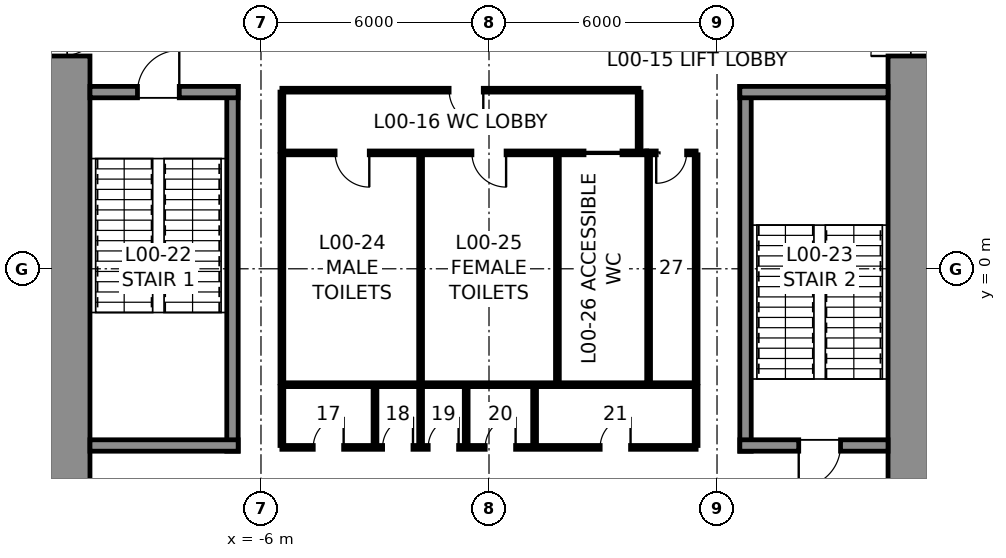
"""IFC4 building model, lengths in metres.
Left out: names, types, materials, properties, quantities, classifications, styles, units other than length and angle.
Written with IfcOpenShell. Run it as: python <this file> out.ifc"""

import sys

from ifc_helpers import new_model, si_unit, direction, frame, frame_2d, origin, place, context, subcontext, project, spatial, rectangle, extrude, element, fill, save


model = new_model("IFC4")
c1 = context("Model", 3, precision=1e-05, world=origin(), true_north=direction((0.0, 1.0)))
c2 = subcontext(c1, "Body", "Model", "MODEL_VIEW")
j1 = project(units=[si_unit("LENGTHUNIT", "METRE"), si_unit("PLANEANGLEUNIT", "RADIAN")], contexts=[c1])
p1 = place(None, origin())
s1 = spatial("IfcSite", under=j1, at=p1, CompositionType="ELEMENT")
p2 = place(p1, origin())
s2 = spatial("IfcBuilding", under=s1, at=p2, CompositionType="ELEMENT")
p3 = place(p2, origin())
s3 = spatial("IfcBuildingStorey", under=s2, at=p3, CompositionType="ELEMENT", Elevation=0.0)
p4 = place(p3, frame((11.25, 10.5, 0.0), z_axis=(0.0, 0.0, 1.0), x_axis=(0.0, -1.0, 0.0)))
e1 = element("IfcWall", 1, at=p4, inside=s3, PredefinedType="SHEAR", context=c2, shape_type="SweptSolid", body=[
    extrude(rectangle(XDim=21.0, YDim=1.5, at=frame_2d((10.5, 0.0))), origin(), (0.0, 0.0, 1.0), 6.0),
])
p5 = place(p4, frame((3.7, 0.0, 0.0)))
e2 = element("IfcOpeningElement", 2, at=p5, cuts=e1, PredefinedType="OPENING", context=c2, shape_type="SweptSolid", body=[
    extrude(rectangle(XDim=1.2, YDim=2.3, at=frame_2d((0.6, 1.15))), frame((0.0, 0.76, 0.0), z_axis=(0.0, -1.0, 0.0), x_axis=(1.0, 0.0, 0.0)), (0.0, 0.0, 1.0), 1.52),
])
p6 = place(p4, frame((16.1, 0.0, 0.0)))
e3 = element("IfcOpeningElement", 3, at=p6, cuts=e1, PredefinedType="OPENING", context=c2, shape_type="SweptSolid", body=[
    extrude(rectangle(XDim=1.2, YDim=2.3, at=frame_2d((0.6, 1.15))), frame((0.0, 0.76, 0.0), z_axis=(0.0, -1.0, 0.0), x_axis=(1.0, 0.0, 0.0)), (0.0, 0.0, 1.0), 1.52),
])
p7 = place(p3, frame((-11.25, -10.5, 0.0), z_axis=(0.0, 0.0, 1.0), x_axis=(0.0, 1.0, 0.0)))
e4 = element("IfcWall", 4, at=p7, inside=s3, PredefinedType="SHEAR", context=c2, shape_type="SweptSolid", body=[
    extrude(rectangle(XDim=21.0, YDim=1.5, at=frame_2d((10.5, 0.0))), origin(), (0.0, 0.0, 1.0), 6.0),
])
p8 = place(p7, frame((16.1, 0.0, 0.0)))
e5 = element("IfcOpeningElement", 5, at=p8, cuts=e4, PredefinedType="OPENING", context=c2, shape_type="SweptSolid", body=[
    extrude(rectangle(XDim=1.2, YDim=2.3, at=frame_2d((0.6, 1.15))), frame((0.0, 0.76, 0.0), z_axis=(0.0, -1.0, 0.0), x_axis=(1.0, 0.0, 0.0)), (0.0, 0.0, 1.0), 1.52),
])
p9 = place(p7, frame((3.7, 0.0, 0.0)))
e6 = element("IfcOpeningElement", 6, at=p9, cuts=e4, PredefinedType="OPENING", context=c2, shape_type="SweptSolid", body=[
    extrude(rectangle(XDim=1.2, YDim=2.3, at=frame_2d((0.6, 1.15))), frame((0.0, 0.76, 0.0), z_axis=(0.0, -1.0, 0.0), x_axis=(1.0, 0.0, 0.0)), (0.0, 0.0, 1.0), 1.52),
])
p10 = place(p3, frame((-6.75, -4.8, 0.0), z_axis=(0.0, 0.0, 1.0), x_axis=(0.0, 1.0, 0.0)))
e7 = element("IfcWall", 7, at=p10, inside=s3, PredefinedType="SOLIDWALL", context=c2, shape_type="SweptSolid", body=[
    extrude(rectangle(XDim=9.6, YDim=0.3, at=frame_2d((4.8, 0.0))), origin(), (0.0, 0.0, 1.0), 5.75),
])
p11 = place(p3, frame((-10.5, 4.65, 0.0), z_axis=(0.0, 0.0, 1.0), x_axis=(1.0, 0.0, 0.0)))
e8 = element("IfcWall", 8, at=p11, inside=s3, PredefinedType="SOLIDWALL", context=c2, shape_type="SweptSolid", body=[
    extrude(rectangle(XDim=3.9, YDim=0.3, at=frame_2d((1.95, 0.0))), origin(), (0.0, 0.0, 1.0), 5.75),
])
p12 = place(p11, frame((1.25, 0.0, 0.0)))
e9 = element("IfcOpeningElement", 9, at=p12, cuts=e8, PredefinedType="OPENING", context=c2, shape_type="SweptSolid", body=[
    extrude(rectangle(XDim=1.1, YDim=2.3, at=frame_2d((0.55, 1.15))), frame((0.0, 0.16, 0.0), z_axis=(0.0, -1.0, 0.0), x_axis=(1.0, 0.0, 0.0)), (0.0, 0.0, 1.0), 0.32),
])
p13 = place(p3, frame((-6.6, -4.65, 0.0), z_axis=(0.0, 0.0, 1.0), x_axis=(-1.0, 0.0, 0.0)))
e10 = element("IfcWall", 10, at=p13, inside=s3, PredefinedType="SOLIDWALL", context=c2, shape_type="SweptSolid", body=[
    extrude(rectangle(XDim=3.9, YDim=0.3, at=frame_2d((1.95, 0.0))), origin(), (0.0, 0.0, 1.0), 5.75),
])
p14 = place(p3, frame((6.75, -4.8, 0.0), z_axis=(0.0, 0.0, 1.0), x_axis=(0.0, 1.0, 0.0)))
e11 = element("IfcWall", 11, at=p14, inside=s3, PredefinedType="SOLIDWALL", context=c2, shape_type="SweptSolid", body=[
    extrude(rectangle(XDim=9.6, YDim=0.3, at=frame_2d((4.8, 0.0))), origin(), (0.0, 0.0, 1.0), 5.75),
])
p15 = place(p3, frame((6.6, 4.65, 0.0), z_axis=(0.0, 0.0, 1.0), x_axis=(1.0, 0.0, 0.0)))
e12 = element("IfcWall", 12, at=p15, inside=s3, PredefinedType="SOLIDWALL", context=c2, shape_type="SweptSolid", body=[
    extrude(rectangle(XDim=3.9, YDim=0.3, at=frame_2d((1.95, 0.0))), origin(), (0.0, 0.0, 1.0), 5.75),
])
p16 = place(p3, frame((10.5, -4.65, 0.0), z_axis=(0.0, 0.0, 1.0), x_axis=(-1.0, 0.0, 0.0)))
e13 = element("IfcWall", 13, at=p16, inside=s3, PredefinedType="SOLIDWALL", context=c2, shape_type="SweptSolid", body=[
    extrude(rectangle(XDim=3.9, YDim=0.3, at=frame_2d((1.95, 0.0))), origin(), (0.0, 0.0, 1.0), 5.75),
])
p17 = place(p16, frame((1.25, 0.0, 0.0)))
e14 = element("IfcOpeningElement", 14, at=p17, cuts=e13, PredefinedType="OPENING", context=c2, shape_type="SweptSolid", body=[
    extrude(rectangle(XDim=1.1, YDim=2.3, at=frame_2d((0.55, 1.15))), frame((0.0, 0.16, 0.0), z_axis=(0.0, -1.0, 0.0), x_axis=(1.0, 0.0, 0.0)), (0.0, 0.0, 1.0), 0.32),
])
p18 = place(p3, frame((-5.45, 3.05, 0.0), z_axis=(0.0, 0.0, 1.0), x_axis=(1.0, 0.0, 0.0)))
e15 = element("IfcWall", 15, at=p18, inside=s3, PredefinedType="PARTITIONING", context=c2, shape_type="SweptSolid", body=[
    extrude(rectangle(XDim=9.6, YDim=0.1, at=frame_2d((4.8, 0.0))), origin(), (0.0, 0.0, 1.0), 5.75),
])
p19 = place(p18, frame((1.4, 0.0, 0.0)))
e16 = element("IfcOpeningElement", 16, at=p19, cuts=e15, PredefinedType="OPENING", context=c2, shape_type="SweptSolid", body=[
    extrude(rectangle(XDim=0.9, YDim=2.3, at=frame_2d((0.45, 1.15))), frame((0.0, 0.06, 0.0), z_axis=(0.0, -1.0, 0.0), x_axis=(1.0, 0.0, 0.0)), (0.0, 0.0, 1.0), 0.12),
])
p20 = place(p18, frame((5.0, 0.0, 0.0)))
e17 = element("IfcOpeningElement", 17, at=p20, cuts=e15, PredefinedType="OPENING", context=c2, shape_type="SweptSolid", body=[
    extrude(rectangle(XDim=0.9, YDim=2.3, at=frame_2d((0.45, 1.15))), frame((0.0, 0.06, 0.0), z_axis=(0.0, -1.0, 0.0), x_axis=(1.0, 0.0, 0.0)), (0.0, 0.0, 1.0), 0.12),
])
p21 = place(p18, frame((7.95, 0.0, 0.0)))
e18 = element("IfcOpeningElement", 18, at=p21, cuts=e15, PredefinedType="OPENING", context=c2, shape_type="SweptSolid", body=[
    extrude(rectangle(XDim=1.0, YDim=2.3, at=frame_2d((0.5, 1.15))), frame((0.0, 0.06, 0.0), z_axis=(0.0, -1.0, 0.0), x_axis=(1.0, 0.0, 0.0)), (0.0, 0.0, 1.0), 0.12),
])
p22 = place(p3, frame((4.15, 3.05, 0.0), z_axis=(0.0, 0.0, 1.0), x_axis=(1.0, 0.0, 0.0)))
e19 = element("IfcWall", 19, at=p22, inside=s3, PredefinedType="PARTITIONING", context=c2, shape_type="SweptSolid", body=[
    extrude(rectangle(XDim=1.3, YDim=0.1, at=frame_2d((0.65, 0.0))), origin(), (0.0, 0.0, 1.0), 5.75),
])
p23 = place(p22, frame((0.25, 0.0, 0.0)))
e20 = element("IfcOpeningElement", 20, at=p23, cuts=e19, PredefinedType="OPENING", context=c2, shape_type="SweptSolid", body=[
    extrude(rectangle(XDim=0.8, YDim=2.3, at=frame_2d((0.4, 1.15))), frame((0.0, 0.06, 0.0), z_axis=(0.0, -1.0, 0.0), x_axis=(1.0, 0.0, 0.0)), (0.0, 0.0, 1.0), 0.12),
])
p24 = place(p3, frame((4.15, -3.05, 0.0), z_axis=(0.0, 0.0, 1.0), x_axis=(-1.0, 0.0, 0.0)))
e21 = element("IfcWall", 21, at=p24, inside=s3, PredefinedType="PARTITIONING", context=c2, shape_type="SweptSolid", body=[
    extrude(rectangle(XDim=9.6, YDim=0.1, at=frame_2d((4.8, 0.0))), origin(), (0.0, 0.0, 1.0), 5.75),
])
p25 = place(p3, frame((5.45, -3.05, 0.0), z_axis=(0.0, 0.0, 1.0), x_axis=(-1.0, 0.0, 0.0)))
e22 = element("IfcWall", 22, at=p25, inside=s3, PredefinedType="PARTITIONING", context=c2, shape_type="SweptSolid", body=[
    extrude(rectangle(XDim=1.3, YDim=0.1, at=frame_2d((0.65, 0.0))), origin(), (0.0, 0.0, 1.0), 5.75),
])
for number, where, z_axis, x_axis in (
    (23, (5.45, 3.0, 0.0), (0.0, 0.0, 1.0), (0.0, -1.0, 0.0)),
    (24, (-5.45, -3.0, 0.0), (0.0, 0.0, 1.0), (0.0, 1.0, 0.0)),
    (25, (-1.8, -3.0, 0.0), (0.0, 0.0, 1.0), (0.0, 1.0, 0.0)),
    (26, (1.8, -3.0, 0.0), (0.0, 0.0, 1.0), (0.0, 1.0, 0.0)),
    (27, (4.2, -3.0, 0.0), (0.0, 0.0, 1.0), (0.0, 1.0, 0.0)),
):
    element("IfcWall", number, at=place(p3, frame(where, z_axis=z_axis, x_axis=x_axis)), inside=s3, PredefinedType="PARTITIONING", context=c2, shape_type="SweptSolid", body=[
        extrude(rectangle(XDim=6.0, YDim=0.1, at=frame_2d((3.0, 0.0))), origin(), (0.0, 0.0, 1.0), 5.75),
    ])
p26 = place(p3, frame((-5.45, 4.7, 0.0), z_axis=(0.0, 0.0, 1.0), x_axis=(1.0, 0.0, 0.0)))
e28 = element("IfcWall", 28, at=p26, inside=s3, PredefinedType="PARTITIONING", context=c2, shape_type="SweptSolid", body=[
    extrude(rectangle(XDim=9.4, YDim=0.1, at=frame_2d((4.7, 0.0))), origin(), (0.0, 0.0, 1.0), 5.75),
])
p27 = place(p26, frame((4.4, 0.0, 0.0)))
e29 = element("IfcOpeningElement", 29, at=p27, cuts=e28, PredefinedType="OPENING", context=c2, shape_type="SweptSolid", body=[
    extrude(rectangle(XDim=0.9, YDim=2.3, at=frame_2d((0.45, 1.15))), frame((0.0, 0.06, 0.0), z_axis=(0.0, -1.0, 0.0), x_axis=(1.0, 0.0, 0.0)), (0.0, 0.0, 1.0), 0.12),
])
for number, where, z_axis, x_axis in (
    (30, (-5.45, 3.1, 0.0), (0.0, 0.0, 1.0), (0.0, 1.0, 0.0)),
    (31, (3.95, 3.1, 0.0), (0.0, 0.0, 1.0), (0.0, 1.0, 0.0)),
):
    element("IfcWall", number, at=place(p3, frame(where, z_axis=z_axis, x_axis=x_axis)), inside=s3, PredefinedType="PARTITIONING", context=c2, shape_type="SweptSolid", body=[
        extrude(rectangle(XDim=1.55, YDim=0.1, at=frame_2d((0.775, 0.0))), origin(), (0.0, 0.0, 1.0), 5.75),
    ])
p28 = place(p3, frame((5.45, -4.7, 0.0), z_axis=(0.0, 0.0, 1.0), x_axis=(-1.0, 0.0, 0.0)))
e32 = element("IfcWall", 32, at=p28, inside=s3, PredefinedType="PARTITIONING", context=c2, shape_type="SweptSolid", body=[
    extrude(rectangle(XDim=10.9, YDim=0.1, at=frame_2d((5.45, 0.0))), origin(), (0.0, 0.0, 1.0), 5.75),
])
p29 = place(p28, frame((9.275, 0.0, 0.0)))
e33 = element("IfcOpeningElement", 33, at=p29, cuts=e32, PredefinedType="OPENING", context=c2, shape_type="SweptSolid", body=[
    extrude(rectangle(XDim=0.8, YDim=2.3, at=frame_2d((0.4, 1.15))), frame((0.0, 0.06, 0.0), z_axis=(0.0, -1.0, 0.0), x_axis=(1.0, 0.0, 0.0)), (0.0, 0.0, 1.0), 0.12),
])
p30 = place(p28, frame((7.45, 0.0, 0.0)))
e34 = element("IfcOpeningElement", 34, at=p30, cuts=e32, PredefinedType="OPENING", context=c2, shape_type="SweptSolid", body=[
    extrude(rectangle(XDim=0.8, YDim=2.3, at=frame_2d((0.4, 1.15))), frame((0.0, 0.06, 0.0), z_axis=(0.0, -1.0, 0.0), x_axis=(1.0, 0.0, 0.0)), (0.0, 0.0, 1.0), 0.12),
])
p31 = place(p28, frame((6.25, 0.0, 0.0)))
e35 = element("IfcOpeningElement", 35, at=p31, cuts=e32, PredefinedType="OPENING", context=c2, shape_type="SweptSolid", body=[
    extrude(rectangle(XDim=0.8, YDim=2.3, at=frame_2d((0.4, 1.15))), frame((0.0, 0.06, 0.0), z_axis=(0.0, -1.0, 0.0), x_axis=(1.0, 0.0, 0.0)), (0.0, 0.0, 1.0), 0.12),
])
p32 = place(p28, frame((4.75, 0.0, 0.0)))
e36 = element("IfcOpeningElement", 36, at=p32, cuts=e32, PredefinedType="OPENING", context=c2, shape_type="SweptSolid", body=[
    extrude(rectangle(XDim=0.8, YDim=2.3, at=frame_2d((0.4, 1.15))), frame((0.0, 0.06, 0.0), z_axis=(0.0, -1.0, 0.0), x_axis=(1.0, 0.0, 0.0)), (0.0, 0.0, 1.0), 0.12),
])
p33 = place(p28, frame((1.725, 0.0, 0.0)))
e37 = element("IfcOpeningElement", 37, at=p33, cuts=e32, PredefinedType="OPENING", context=c2, shape_type="SweptSolid", body=[
    extrude(rectangle(XDim=0.8, YDim=2.3, at=frame_2d((0.4, 1.15))), frame((0.0, 0.06, 0.0), z_axis=(0.0, -1.0, 0.0), x_axis=(1.0, 0.0, 0.0)), (0.0, 0.0, 1.0), 0.12),
])
for number, where, z_axis, x_axis in (
    (38, (-5.45, -3.1, 0.0), (0.0, 0.0, 1.0), (0.0, -1.0, 0.0)),
    (39, (5.45, -3.1, 0.0), (0.0, 0.0, 1.0), (0.0, -1.0, 0.0)),
    (40, (-3.0, -3.1, 0.0), (0.0, 0.0, 1.0), (0.0, -1.0, 0.0)),
    (41, (-1.8, -3.1, 0.0), (0.0, 0.0, 1.0), (0.0, -1.0, 0.0)),
    (42, (-0.6, -3.1, 0.0), (0.0, 0.0, 1.0), (0.0, -1.0, 0.0)),
    (43, (1.2, -3.1, 0.0), (0.0, 0.0, 1.0), (0.0, -1.0, 0.0)),
):
    element("IfcWall", number, at=place(p3, frame(where, z_axis=z_axis, x_axis=x_axis)), inside=s3, PredefinedType="PARTITIONING", context=c2, shape_type="SweptSolid", body=[
        extrude(rectangle(XDim=1.55, YDim=0.1, at=frame_2d((0.775, 0.0))), origin(), (0.0, 0.0, 1.0), 5.75),
    ])
p34 = place(p12, origin())
e44 = element("IfcDoor", 44, at=p34, inside=s3, OperationType="SINGLE_SWING_RIGHT", PredefinedType="DOOR", context=c2, shape_type="SweptSolid", body=[
    extrude(rectangle(XDim=1.1, YDim=2.3, at=frame_2d((0.55, 1.15))), frame((0.0, 0.025, 0.0), z_axis=(0.0, -1.0, 0.0), x_axis=(1.0, 0.0, 0.0)), (0.0, 0.0, 1.0), 0.05),
])
fill(e9, e44)
p35 = place(p17, origin())
e45 = element("IfcDoor", 45, at=p35, inside=s3, OperationType="SINGLE_SWING_RIGHT", PredefinedType="DOOR", context=c2, shape_type="SweptSolid", body=[
    extrude(rectangle(XDim=1.1, YDim=2.3, at=frame_2d((0.55, 1.15))), frame((0.0, 0.025, 0.0), z_axis=(0.0, -1.0, 0.0), x_axis=(1.0, 0.0, 0.0)), (0.0, 0.0, 1.0), 0.05),
])
fill(e14, e45)
p36 = place(p19, frame((0.9, 0.0, 0.0), z_axis=(0.0, 0.0, 1.0), x_axis=(-1.0, 0.0, 0.0)))
e46 = element("IfcDoor", 46, at=p36, inside=s3, OperationType="SINGLE_SWING_LEFT", PredefinedType="DOOR", context=c2, shape_type="SweptSolid", body=[
    extrude(rectangle(XDim=0.9, YDim=2.3, at=frame_2d((0.45, 1.15))), frame((0.0, 0.025, 0.0), z_axis=(0.0, -1.0, 0.0), x_axis=(1.0, 0.0, 0.0)), (0.0, 0.0, 1.0), 0.05),
])
fill(e16, e46)
p37 = place(p20, frame((0.9, 0.0, 0.0), z_axis=(0.0, 0.0, 1.0), x_axis=(-1.0, 0.0, 0.0)))
e47 = element("IfcDoor", 47, at=p37, inside=s3, OperationType="SINGLE_SWING_LEFT", PredefinedType="DOOR", context=c2, shape_type="SweptSolid", body=[
    extrude(rectangle(XDim=0.9, YDim=2.3, at=frame_2d((0.45, 1.15))), frame((0.0, 0.025, 0.0), z_axis=(0.0, -1.0, 0.0), x_axis=(1.0, 0.0, 0.0)), (0.0, 0.0, 1.0), 0.05),
])
fill(e17, e47)
p38 = place(p21, frame((1.0, 0.0, 0.0), z_axis=(0.0, 0.0, 1.0), x_axis=(-1.0, 0.0, 0.0)))
e48 = element("IfcDoor", 48, at=p38, inside=s3, OperationType="SLIDING_TO_LEFT", PredefinedType="DOOR", context=c2, shape_type="SweptSolid", body=[
    extrude(rectangle(XDim=1.0, YDim=2.3, at=frame_2d((0.5, 1.15))), frame((0.0, 0.025, 0.0), z_axis=(0.0, -1.0, 0.0), x_axis=(1.0, 0.0, 0.0)), (0.0, 0.0, 1.0), 0.05),
])
fill(e18, e48)
p39 = place(p23, frame((0.8, 0.0, 0.0), z_axis=(0.0, 0.0, 1.0), x_axis=(-1.0, 0.0, 0.0)))
e49 = element("IfcDoor", 49, at=p39, inside=s3, OperationType="SINGLE_SWING_RIGHT", PredefinedType="DOOR", context=c2, shape_type="SweptSolid", body=[
    extrude(rectangle(XDim=0.8, YDim=2.3, at=frame_2d((0.4, 1.15))), frame((0.0, 0.025, 0.0), z_axis=(0.0, -1.0, 0.0), x_axis=(1.0, 0.0, 0.0)), (0.0, 0.0, 1.0), 0.05),
])
fill(e20, e49)
p40 = place(p27, frame((0.9, 0.0, 0.0), z_axis=(0.0, 0.0, 1.0), x_axis=(-1.0, 0.0, 0.0)))
e50 = element("IfcDoor", 50, at=p40, inside=s3, OperationType="SINGLE_SWING_LEFT", PredefinedType="DOOR", context=c2, shape_type="SweptSolid", body=[
    extrude(rectangle(XDim=0.9, YDim=2.3, at=frame_2d((0.45, 1.15))), frame((0.0, 0.025, 0.0), z_axis=(0.0, -1.0, 0.0), x_axis=(1.0, 0.0, 0.0)), (0.0, 0.0, 1.0), 0.05),
])
fill(e29, e50)
p41 = place(p29, frame((0.8, 0.0, 0.0), z_axis=(0.0, 0.0, 1.0), x_axis=(-1.0, 0.0, 0.0)))
e51 = element("IfcDoor", 51, at=p41, inside=s3, OperationType="SINGLE_SWING_RIGHT", PredefinedType="DOOR", context=c2, shape_type="SweptSolid", body=[
    extrude(rectangle(XDim=0.8, YDim=2.3, at=frame_2d((0.4, 1.15))), frame((0.0, 0.025, 0.0), z_axis=(0.0, -1.0, 0.0), x_axis=(1.0, 0.0, 0.0)), (0.0, 0.0, 1.0), 0.05),
])
fill(e33, e51)
p42 = place(p30, frame((0.8, 0.0, 0.0), z_axis=(0.0, 0.0, 1.0), x_axis=(-1.0, 0.0, 0.0)))
e52 = element("IfcDoor", 52, at=p42, inside=s3, OperationType="SINGLE_SWING_RIGHT", PredefinedType="DOOR", context=c2, shape_type="SweptSolid", body=[
    extrude(rectangle(XDim=0.8, YDim=2.3, at=frame_2d((0.4, 1.15))), frame((0.0, 0.025, 0.0), z_axis=(0.0, -1.0, 0.0), x_axis=(1.0, 0.0, 0.0)), (0.0, 0.0, 1.0), 0.05),
])
fill(e34, e52)
p43 = place(p31, frame((0.8, 0.0, 0.0), z_axis=(0.0, 0.0, 1.0), x_axis=(-1.0, 0.0, 0.0)))
e53 = element("IfcDoor", 53, at=p43, inside=s3, OperationType="SINGLE_SWING_RIGHT", PredefinedType="DOOR", context=c2, shape_type="SweptSolid", body=[
    extrude(rectangle(XDim=0.8, YDim=2.3, at=frame_2d((0.4, 1.15))), frame((0.0, 0.025, 0.0), z_axis=(0.0, -1.0, 0.0), x_axis=(1.0, 0.0, 0.0)), (0.0, 0.0, 1.0), 0.05),
])
fill(e35, e53)
p44 = place(p32, frame((0.8, 0.0, 0.0), z_axis=(0.0, 0.0, 1.0), x_axis=(-1.0, 0.0, 0.0)))
e54 = element("IfcDoor", 54, at=p44, inside=s3, OperationType="SINGLE_SWING_RIGHT", PredefinedType="DOOR", context=c2, shape_type="SweptSolid", body=[
    extrude(rectangle(XDim=0.8, YDim=2.3, at=frame_2d((0.4, 1.15))), frame((0.0, 0.025, 0.0), z_axis=(0.0, -1.0, 0.0), x_axis=(1.0, 0.0, 0.0)), (0.0, 0.0, 1.0), 0.05),
])
fill(e36, e54)
p45 = place(p33, frame((0.8, 0.0, 0.0), z_axis=(0.0, 0.0, 1.0), x_axis=(-1.0, 0.0, 0.0)))
e55 = element("IfcDoor", 55, at=p45, inside=s3, OperationType="SINGLE_SWING_RIGHT", PredefinedType="DOOR", context=c2, shape_type="SweptSolid", body=[
    extrude(rectangle(XDim=0.8, YDim=2.3, at=frame_2d((0.4, 1.15))), frame((0.0, 0.025, 0.0), z_axis=(0.0, -1.0, 0.0), x_axis=(1.0, 0.0, 0.0)), (0.0, 0.0, 1.0), 0.05),
])
fill(e37, e55)
p46 = place(p8, frame((1.2, 0.0, 0.0), z_axis=(0.0, 0.0, 1.0), x_axis=(-1.0, 0.0, 0.0)))
e56 = element("IfcDoor", 56, at=p46, inside=s3, OperationType="SINGLE_SWING_LEFT", PredefinedType="DOOR", context=c2, shape_type="SweptSolid", body=[
    extrude(rectangle(XDim=1.2, YDim=2.3, at=frame_2d((0.6, 1.15))), frame((0.0, 0.025, 0.0), z_axis=(0.0, -1.0, 0.0), x_axis=(1.0, 0.0, 0.0)), (0.0, 0.0, 1.0), 0.05),
])
fill(e5, e56)
p47 = place(p5, frame((1.2, 0.0, 0.0), z_axis=(0.0, 0.0, 1.0), x_axis=(-1.0, 0.0, 0.0)))
e57 = element("IfcDoor", 57, at=p47, inside=s3, OperationType="SINGLE_SWING_LEFT", PredefinedType="DOOR", context=c2, shape_type="SweptSolid", body=[
    extrude(rectangle(XDim=1.2, YDim=2.3, at=frame_2d((0.6, 1.15))), frame((0.0, 0.025, 0.0), z_axis=(0.0, -1.0, 0.0), x_axis=(1.0, 0.0, 0.0)), (0.0, 0.0, 1.0), 0.05),
])
fill(e2, e57)
save(model, sys.argv[1])
